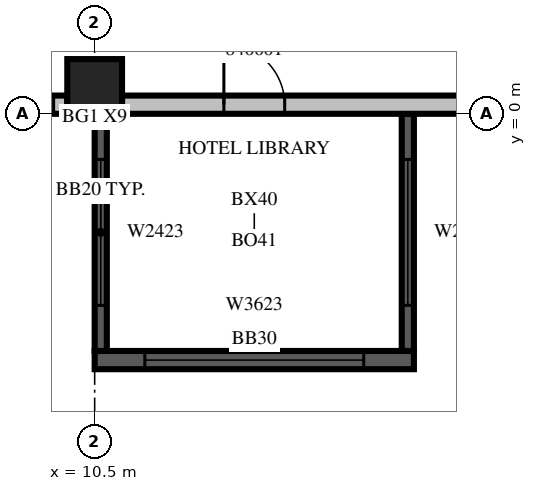
"""IFC4 building model, lengths in metres.
Left out: names, types, materials, properties, quantities, classifications, styles, units other than length and angle.
Written with IfcOpenShell. Run it as: python <this file> out.ifc"""

import sys

from ifc_helpers import new_model, si_unit, direction, frame, frame_2d, origin, origin_2d, place, context, subcontext, project, spatial, rectangle, extrude, source, transform, mapped, element, fill, save


model = new_model("IFC4")
c1 = context("Model", 3, precision=1e-05, world=origin(), true_north=direction((0.0, 1.0)))
c2 = subcontext(c1, "Body", "Model", "MODEL_VIEW")
j1 = project(units=[si_unit("LENGTHUNIT", "METRE"), si_unit("PLANEANGLEUNIT", "RADIAN")], contexts=[c1])
p1 = place(None, origin())
s1 = spatial("IfcSite", under=j1, at=p1, CompositionType="ELEMENT")
p2 = place(p1, origin())
s2 = spatial("IfcBuilding", under=s1, at=p2, CompositionType="ELEMENT")
p3 = place(p2, frame((0.0, 0.0, 185.4)))
s3 = spatial("IfcBuildingStorey", under=s2, at=p3, CompositionType="ELEMENT", Elevation=185.4)
m1 = source(origin(), c2, "Body", "SweptSolid", [
    extrude(rectangle(XDim=0.9, YDim=0.9, at=origin_2d()), origin(), (0.0, 0.0, 1.0), 3.8),
])
p4 = place(p3, frame((10.5, 0.45, 0.0), z_axis=(0.0, 0.0, 1.0), x_axis=(1.0, 0.0, 0.0)))
e1 = element("IfcColumn", 1, at=p4, inside=s3, PredefinedType="COLUMN", context=c2, shape_type="MappedRepresentation", body=[
    mapped(m1, transform((0.0, 0.0, 0.0), scale=1.0)),
])
p5 = place(p3, frame((10.5, -4.05, 0.0), z_axis=(0.0, 0.0, 1.0), x_axis=(1.0, 0.0, 0.0)))
e2 = element("IfcWall", 2, at=p5, inside=s3, PredefinedType="SOLIDWALL", context=c2, shape_type="SweptSolid", body=[
    extrude(rectangle(XDim=5.25, YDim=0.3, at=frame_2d((2.625, 0.0))), origin(), (0.0, 0.0, 1.0), 3.4),
])
m2 = source(origin(), c2, "Body", "SweptSolid", [
    extrude(rectangle(XDim=3.6, YDim=2.3, at=frame_2d((1.8, 1.15))), frame((0.0, 0.16, 0.0), z_axis=(0.0, -1.0, 0.0), x_axis=(1.0, 0.0, 0.0)), (0.0, 0.0, 1.0), 0.32),
])
p6 = place(p5, frame((0.825, 0.0, 0.6)))
e3 = element("IfcOpeningElement", 3, at=p6, cuts=e2, PredefinedType="OPENING", context=c2, shape_type="MappedRepresentation", body=[
    mapped(m2, transform((0.0, 0.0, 0.0), scale=1.0)),
])
m3 = source(origin(), c2, "Body", "SweptSolid", [
    extrude(rectangle(XDim=3.9, YDim=0.2, at=frame_2d((1.95, 0.0))), origin(), (0.0, 0.0, 1.0), 3.4),
])
p7 = place(p3, frame((10.6, 0.0, 0.0), z_axis=(0.0, 0.0, 1.0), x_axis=(0.0, -1.0, 0.0)))
e4 = element("IfcWall", 4, at=p7, inside=s3, PredefinedType="SOLIDWALL", context=c2, shape_type="MappedRepresentation", body=[
    mapped(m3, transform((0.0, 0.0, 0.0), scale=1.0)),
])
m4 = source(origin(), c2, "Body", "SweptSolid", [
    extrude(rectangle(XDim=2.4, YDim=2.3, at=frame_2d((1.2, 1.15))), frame((0.0, 0.11, 0.0), z_axis=(0.0, -1.0, 0.0), x_axis=(1.0, 0.0, 0.0)), (0.0, 0.0, 1.0), 0.22),
])
p8 = place(p7, frame((0.75, 0.0, 0.6)))
e5 = element("IfcOpeningElement", 5, at=p8, cuts=e4, PredefinedType="OPENING", context=c2, shape_type="MappedRepresentation", body=[
    mapped(m4, transform((0.0, 0.0, 0.0), scale=1.0)),
])
p9 = place(p3, frame((15.65, 0.0, 0.0), z_axis=(0.0, 0.0, 1.0), x_axis=(0.0, -1.0, 0.0)))
e6 = element("IfcWall", 6, at=p9, inside=s3, PredefinedType="SOLIDWALL", context=c2, shape_type="MappedRepresentation", body=[
    mapped(m3, transform((0.0, 0.0, 0.0), scale=1.0)),
])
p10 = place(p9, frame((0.75, 0.0, 0.6)))
e7 = element("IfcOpeningElement", 7, at=p10, cuts=e6, PredefinedType="OPENING", context=c2, shape_type="MappedRepresentation", body=[
    mapped(m4, transform((0.0, 0.0, 0.0), scale=1.0)),
])
m5 = source(origin(), c2, "Body", "SweptSolid", [
    extrude(rectangle(XDim=2.7, YDim=0.3, at=frame_2d((1.35, 0.0))), origin(), (0.0, 0.0, 1.0), 3.4),
])
p11 = place(p3, frame((7.35, 0.15, 0.0), z_axis=(0.0, 0.0, 1.0), x_axis=(1.0, 0.0, 0.0)))
e8 = element("IfcWall", 8, at=p11, inside=s3, PredefinedType="STANDARD", context=c2, shape_type="MappedRepresentation", body=[
    mapped(m5, transform((0.0, 0.0, 0.0), scale=1.0)),
])
m6 = source(origin(), c2, "Body", "SweptSolid", [
    extrude(rectangle(XDim=1.8, YDim=2.3, at=frame_2d((0.9, 1.15))), frame((0.0, 0.16, 0.0), z_axis=(0.0, -1.0, 0.0), x_axis=(1.0, 0.0, 0.0)), (0.0, 0.0, 1.0), 0.32),
])
p12 = place(p11, frame((0.675, 0.0, 0.6)))
e9 = element("IfcOpeningElement", 9, at=p12, cuts=e8, PredefinedType="OPENING", context=c2, shape_type="MappedRepresentation", body=[
    mapped(m6, transform((0.0, 0.0, 0.0), scale=1.0)),
])
m7 = source(origin(), c2, "Body", "SweptSolid", [
    extrude(rectangle(XDim=9.6, YDim=0.3, at=frame_2d((4.8, 0.0))), origin(), (0.0, 0.0, 1.0), 3.4),
])
p13 = place(p3, frame((10.95, 0.15, 0.0), z_axis=(0.0, 0.0, 1.0), x_axis=(1.0, 0.0, 0.0)))
e10 = element("IfcWall", 10, at=p13, inside=s3, PredefinedType="STANDARD", context=c2, shape_type="MappedRepresentation", body=[
    mapped(m7, transform((0.0, 0.0, 0.0), scale=1.0)),
])
p14 = place(p13, frame((5.625, 0.0, 0.6)))
e11 = element("IfcOpeningElement", 11, at=p14, cuts=e10, PredefinedType="OPENING", context=c2, shape_type="MappedRepresentation", body=[
    mapped(m2, transform((0.0, 0.0, 0.0), scale=1.0)),
])
m8 = source(origin(), c2, "Body", "SweptSolid", [
    extrude(rectangle(XDim=1.0, YDim=2.1, at=frame_2d((0.5, 1.05))), frame((0.0, 0.16, 0.0), z_axis=(0.0, -1.0, 0.0), x_axis=(1.0, 0.0, 0.0)), (0.0, 0.0, 1.0), 0.32),
])
p15 = place(p13, frame((1.675, 0.0, 0.0)))
e12 = element("IfcOpeningElement", 12, at=p15, cuts=e10, PredefinedType="OPENING", context=c2, shape_type="MappedRepresentation", body=[
    mapped(m8, transform((0.0, 0.0, 0.0), scale=1.0)),
])
m9 = source(origin(), c2, "Body", "SweptSolid", [
    extrude(rectangle(XDim=3.6, YDim=2.3, at=frame_2d((1.8, 1.15))), frame((0.0, 0.03, 0.0), z_axis=(0.0, -1.0, 0.0), x_axis=(1.0, 0.0, 0.0)), (0.0, 0.0, 1.0), 0.06),
])
p16 = place(p6, origin())
e13 = element("IfcWindow", 13, at=p16, inside=s3, PartitioningType="SINGLE_PANEL", PredefinedType="WINDOW", context=c2, shape_type="MappedRepresentation", body=[
    mapped(m9, transform((0.0, 0.0, 0.0), scale=1.0)),
])
fill(e3, e13)
m10 = source(origin(), c2, "Body", "SweptSolid", [
    extrude(rectangle(XDim=2.4, YDim=2.3, at=frame_2d((1.2, 1.15))), frame((0.0, 0.03, 0.0), z_axis=(0.0, -1.0, 0.0), x_axis=(1.0, 0.0, 0.0)), (0.0, 0.0, 1.0), 0.06),
])
p17 = place(p8, origin())
e14 = element("IfcWindow", 14, at=p17, inside=s3, PartitioningType="SINGLE_PANEL", PredefinedType="WINDOW", context=c2, shape_type="MappedRepresentation", body=[
    mapped(m10, transform((0.0, 0.0, 0.0), scale=1.0)),
])
fill(e5, e14)
p18 = place(p10, origin())
e15 = element("IfcWindow", 15, at=p18, inside=s3, PartitioningType="SINGLE_PANEL", PredefinedType="WINDOW", context=c2, shape_type="MappedRepresentation", body=[
    mapped(m10, transform((0.0, 0.0, 0.0), scale=1.0)),
])
fill(e7, e15)
m11 = source(origin(), c2, "Body", "SweptSolid", [
    extrude(rectangle(XDim=1.8, YDim=2.3, at=frame_2d((0.9, 1.15))), frame((0.0, 0.03, 0.0), z_axis=(0.0, -1.0, 0.0), x_axis=(1.0, 0.0, 0.0)), (0.0, 0.0, 1.0), 0.06),
])
p19 = place(p12, origin())
e16 = element("IfcWindow", 16, at=p19, inside=s3, PartitioningType="SINGLE_PANEL", PredefinedType="WINDOW", context=c2, shape_type="MappedRepresentation", body=[
    mapped(m11, transform((0.0, 0.0, 0.0), scale=1.0)),
])
fill(e9, e16)
m12 = source(origin(), c2, "Body", "SweptSolid", [
    extrude(rectangle(XDim=1.0, YDim=2.1, at=frame_2d((0.5, 1.05))), frame((0.0, 0.025, 0.0), z_axis=(0.0, -1.0, 0.0), x_axis=(1.0, 0.0, 0.0)), (0.0, 0.0, 1.0), 0.05),
])
p20 = place(p15, origin())
e17 = element("IfcDoor", 17, at=p20, inside=s3, OperationType="SINGLE_SWING_LEFT", PredefinedType="DOOR", context=c2, shape_type="MappedRepresentation", body=[
    mapped(m12, transform((0.0, 0.0, 0.0), scale=1.0)),
])
fill(e12, e17)
save(model, sys.argv[1])
